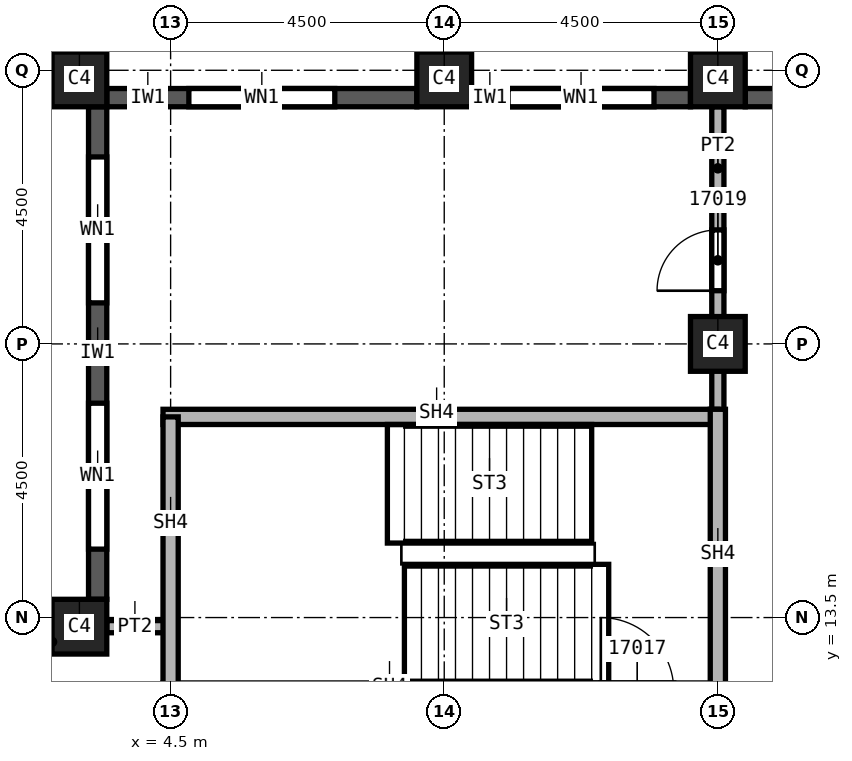
"""IFC4 building model, lengths in metres.
Left out: names, types, materials, properties, quantities, classifications, styles, units other than length and angle.
Written with IfcOpenShell. Run it as: python <this file> out.ifc"""

import sys

from ifc_helpers import new_model, si_unit, direction, frame, frame_2d, origin, origin_2d, place, context, subcontext, project, spatial, rectangle, extrude, element, fill, save


model = new_model("IFC4")
c1 = context("Model", 3, precision=1e-05, world=origin(), true_north=direction((0.0, 1.0)))
c2 = subcontext(c1, "Body", "Model", "MODEL_VIEW")
j1 = project(units=[si_unit("LENGTHUNIT", "METRE"), si_unit("PLANEANGLEUNIT", "RADIAN")], contexts=[c1])
p1 = place(None, origin())
s1 = spatial("IfcSite", under=j1, at=p1, CompositionType="ELEMENT")
p2 = place(p1, origin())
s2 = spatial("IfcBuilding", under=s1, at=p2, CompositionType="ELEMENT")
p3 = place(p2, frame((0.0, 0.0, 254.0)))
s3 = spatial("IfcBuildingStorey", under=s2, at=p3, CompositionType="ELEMENT", Elevation=254.0)
for number, where, z_axis, x_axis in (
    (1, (13.5, 18.0, 0.0), (0.0, 0.0, 1.0), (1.0, 0.0, 0.0)),
    (2, (3.0, 22.35, 0.0), (0.0, 0.0, 1.0), (1.0, 0.0, 0.0)),
    (3, (9.0, 22.35, 0.0), (0.0, 0.0, 1.0), (1.0, 0.0, 0.0)),
    (4, (13.5, 22.35, 0.0), (0.0, 0.0, 1.0), (1.0, 0.0, 0.0)),
    (5, (3.0, 13.35, 0.0), (0.0, 0.0, 1.0), (1.0, 0.0, 0.0)),
):
    element("IfcColumn", number, at=place(p3, frame(where, z_axis=z_axis, x_axis=x_axis)), inside=s3, PredefinedType="COLUMN", context=c2, shape_type="SweptSolid", body=[
        extrude(rectangle(XDim=0.9, YDim=0.9, at=origin_2d()), origin(), (0.0, 0.0, 1.0), 3.72),
    ])
p4 = place(p3, frame((17.55, 22.05, 0.0), z_axis=(0.0, 0.0, 1.0), x_axis=(-1.0, 0.0, 0.0)))
e6 = element("IfcWall", 6, at=p4, inside=s3, PredefinedType="SOLIDWALL", context=c2, shape_type="SweptSolid", body=[
    extrude(rectangle(XDim=3.6, YDim=0.3, at=frame_2d((1.8, 0.0))), origin(), (0.0, 0.0, 1.0), 3.12),
])
p5 = place(p4, frame((0.775, 0.0, 0.8)))
e7 = element("IfcOpeningElement", 7, at=p5, cuts=e6, PredefinedType="OPENING", context=c2, shape_type="SweptSolid", body=[
    extrude(rectangle(XDim=1.0, YDim=1.95, at=frame_2d((0.5, 0.975))), frame((0.0, 0.15, 0.0), z_axis=(0.0, -1.0, 0.0), x_axis=(1.0, 0.0, 0.0)), (0.0, 0.0, 1.0), 0.3),
])
p6 = place(p4, frame((2.375, 0.0, 0.8)))
e8 = element("IfcOpeningElement", 8, at=p6, cuts=e6, PredefinedType="OPENING", context=c2, shape_type="SweptSolid", body=[
    extrude(rectangle(XDim=0.6, YDim=1.95, at=frame_2d((0.3, 0.975))), frame((0.0, 0.15, 0.0), z_axis=(0.0, -1.0, 0.0), x_axis=(1.0, 0.0, 0.0)), (0.0, 0.0, 1.0), 0.3),
])
p7 = place(p3, frame((13.05, 22.05, 0.0), z_axis=(0.0, 0.0, 1.0), x_axis=(-1.0, 0.0, 0.0)))
e9 = element("IfcWall", 9, at=p7, inside=s3, PredefinedType="SOLIDWALL", context=c2, shape_type="SweptSolid", body=[
    extrude(rectangle(XDim=3.6, YDim=0.3, at=frame_2d((1.8, 0.0))), origin(), (0.0, 0.0, 1.0), 3.12),
])
p8 = place(p7, frame((0.6, 0.0, 0.8)))
e10 = element("IfcOpeningElement", 10, at=p8, cuts=e9, PredefinedType="OPENING", context=c2, shape_type="SweptSolid", body=[
    extrude(rectangle(XDim=2.4, YDim=1.95, at=frame_2d((1.2, 0.975))), frame((0.0, 0.15, 0.0), z_axis=(0.0, -1.0, 0.0), x_axis=(1.0, 0.0, 0.0)), (0.0, 0.0, 1.0), 0.3),
])
p9 = place(p3, frame((8.55, 22.05, 0.0), z_axis=(0.0, 0.0, 1.0), x_axis=(-1.0, 0.0, 0.0)))
e11 = element("IfcWall", 11, at=p9, inside=s3, PredefinedType="SOLIDWALL", context=c2, shape_type="SweptSolid", body=[
    extrude(rectangle(XDim=5.1, YDim=0.3, at=frame_2d((2.55, 0.0))), origin(), (0.0, 0.0, 1.0), 3.12),
])
p10 = place(p9, frame((1.35, 0.0, 0.8)))
e12 = element("IfcOpeningElement", 12, at=p10, cuts=e11, PredefinedType="OPENING", context=c2, shape_type="SweptSolid", body=[
    extrude(rectangle(XDim=2.4, YDim=1.95, at=frame_2d((1.2, 0.975))), frame((0.0, 0.15, 0.0), z_axis=(0.0, -1.0, 0.0), x_axis=(1.0, 0.0, 0.0)), (0.0, 0.0, 1.0), 0.3),
])
p11 = place(p3, frame((3.3, 21.9, 0.0), z_axis=(0.0, 0.0, 1.0), x_axis=(0.0, -1.0, 0.0)))
e13 = element("IfcWall", 13, at=p11, inside=s3, PredefinedType="SOLIDWALL", context=c2, shape_type="SweptSolid", body=[
    extrude(rectangle(XDim=8.1, YDim=0.3, at=frame_2d((4.05, 0.0))), origin(), (0.0, 0.0, 1.0), 3.12),
])
p12 = place(p11, frame((0.825, 0.0, 0.8)))
e14 = element("IfcOpeningElement", 14, at=p12, cuts=e13, PredefinedType="OPENING", context=c2, shape_type="SweptSolid", body=[
    extrude(rectangle(XDim=2.4, YDim=1.95, at=frame_2d((1.2, 0.975))), frame((0.0, 0.15, 0.0), z_axis=(0.0, -1.0, 0.0), x_axis=(1.0, 0.0, 0.0)), (0.0, 0.0, 1.0), 0.3),
])
p13 = place(p11, frame((4.875, 0.0, 0.8)))
e15 = element("IfcOpeningElement", 15, at=p13, cuts=e13, PredefinedType="OPENING", context=c2, shape_type="SweptSolid", body=[
    extrude(rectangle(XDim=2.4, YDim=1.95, at=frame_2d((1.2, 0.975))), frame((0.0, 0.15, 0.0), z_axis=(0.0, -1.0, 0.0), x_axis=(1.0, 0.0, 0.0)), (0.0, 0.0, 1.0), 0.3),
])
p14 = place(p3, frame((3.45, 13.35, 0.0), z_axis=(0.0, 0.0, 1.0), x_axis=(1.0, 0.0, 0.0)))
e16 = element("IfcWall", 16, at=p14, inside=s3, PredefinedType="PARTITIONING", context=c2, shape_type="SweptSolid", body=[
    extrude(rectangle(XDim=1.049, YDim=0.2, at=frame_2d((0.524, 0.0))), origin(), (0.0, 0.0, 1.0), 3.72),
])
p15 = place(p3, frame((13.5, 16.675, 0.0), z_axis=(0.0, 0.0, 1.0), x_axis=(0.0, 1.0, 0.0)))
e17 = element("IfcWall", 17, at=p15, inside=s3, PredefinedType="PARTITIONING", context=c2, shape_type="SweptSolid", body=[
    extrude(rectangle(XDim=5.225, YDim=0.2, at=frame_2d((2.612, 0.0))), origin(), (0.0, 0.0, 1.0), 3.72),
])
p16 = place(p15, frame((2.2, 0.0, 0.0)))
e18 = element("IfcOpeningElement", 18, at=p16, cuts=e17, PredefinedType="OPENING", context=c2, shape_type="SweptSolid", body=[
    extrude(rectangle(XDim=1.0, YDim=2.1, at=frame_2d((0.5, 1.05))), frame((0.0, 0.1, 0.0), z_axis=(0.0, -1.0, 0.0), x_axis=(1.0, 0.0, 0.0)), (0.0, 0.0, 1.0), 0.2),
])
p17 = place(p3, frame((4.375, 16.8, 0.0), z_axis=(0.0, 0.0, 1.0), x_axis=(1.0, 0.0, 0.0)))
e19 = element("IfcWall", 19, at=p17, inside=s3, PredefinedType="SOLIDWALL", context=c2, shape_type="SweptSolid", body=[
    extrude(rectangle(XDim=9.125, YDim=0.25, at=frame_2d((4.562, 0.0))), origin(), (0.0, 0.0, 1.0), 3.72),
])
p18 = place(p3, frame((4.5, 12.3, 0.0), z_axis=(0.0, 0.0, 1.0), x_axis=(0.0, 1.0, 0.0)))
e20 = element("IfcWall", 20, at=p18, inside=s3, PredefinedType="SOLIDWALL", context=c2, shape_type="SweptSolid", body=[
    extrude(rectangle(XDim=4.5, YDim=0.25, at=frame_2d((2.25, 0.0))), origin(), (0.0, 0.0, 1.0), 3.72),
])
p19 = place(p3, frame((13.5, 12.175, 0.0), z_axis=(0.0, 0.0, 1.0), x_axis=(0.0, 1.0, 0.0)))
e21 = element("IfcWall", 21, at=p19, inside=s3, PredefinedType="SOLIDWALL", context=c2, shape_type="SweptSolid", body=[
    extrude(rectangle(XDim=4.75, YDim=0.25, at=frame_2d((2.375, 0.0))), origin(), (0.0, 0.0, 1.0), 3.72),
])
p20 = place(p8, origin())
e22 = element("IfcWindow", 22, at=p20, inside=s3, PartitioningType="SINGLE_PANEL", PredefinedType="WINDOW", context=c2, shape_type="SweptSolid", body=[
    extrude(rectangle(XDim=2.4, YDim=1.95, at=frame_2d((1.2, 0.975))), frame((0.0, 0.03, 0.0), z_axis=(0.0, -1.0, 0.0), x_axis=(1.0, 0.0, 0.0)), (0.0, 0.0, 1.0), 0.06),
])
fill(e10, e22)
p21 = place(p10, origin())
e23 = element("IfcWindow", 23, at=p21, inside=s3, PartitioningType="SINGLE_PANEL", PredefinedType="WINDOW", context=c2, shape_type="SweptSolid", body=[
    extrude(rectangle(XDim=2.4, YDim=1.95, at=frame_2d((1.2, 0.975))), frame((0.0, 0.03, 0.0), z_axis=(0.0, -1.0, 0.0), x_axis=(1.0, 0.0, 0.0)), (0.0, 0.0, 1.0), 0.06),
])
fill(e12, e23)
p22 = place(p12, origin())
e24 = element("IfcWindow", 24, at=p22, inside=s3, PartitioningType="SINGLE_PANEL", PredefinedType="WINDOW", context=c2, shape_type="SweptSolid", body=[
    extrude(rectangle(XDim=2.4, YDim=1.95, at=frame_2d((1.2, 0.975))), frame((0.0, 0.03, 0.0), z_axis=(0.0, -1.0, 0.0), x_axis=(1.0, 0.0, 0.0)), (0.0, 0.0, 1.0), 0.06),
])
fill(e14, e24)
p23 = place(p13, origin())
e25 = element("IfcWindow", 25, at=p23, inside=s3, PartitioningType="SINGLE_PANEL", PredefinedType="WINDOW", context=c2, shape_type="SweptSolid", body=[
    extrude(rectangle(XDim=2.4, YDim=1.95, at=frame_2d((1.2, 0.975))), frame((0.0, 0.03, 0.0), z_axis=(0.0, -1.0, 0.0), x_axis=(1.0, 0.0, 0.0)), (0.0, 0.0, 1.0), 0.06),
])
fill(e15, e25)
p24 = place(p16, origin())
e26 = element("IfcDoor", 26, at=p24, inside=s3, OperationType="SINGLE_SWING_RIGHT", PredefinedType="DOOR", context=c2, shape_type="SweptSolid", body=[
    extrude(rectangle(XDim=1.0, YDim=2.1, at=frame_2d((0.5, 1.05))), frame((0.0, 0.025, 0.0), z_axis=(0.0, -1.0, 0.0), x_axis=(1.0, 0.0, 0.0)), (0.0, 0.0, 1.0), 0.05),
])
fill(e18, e26)
save(model, sys.argv[1])
